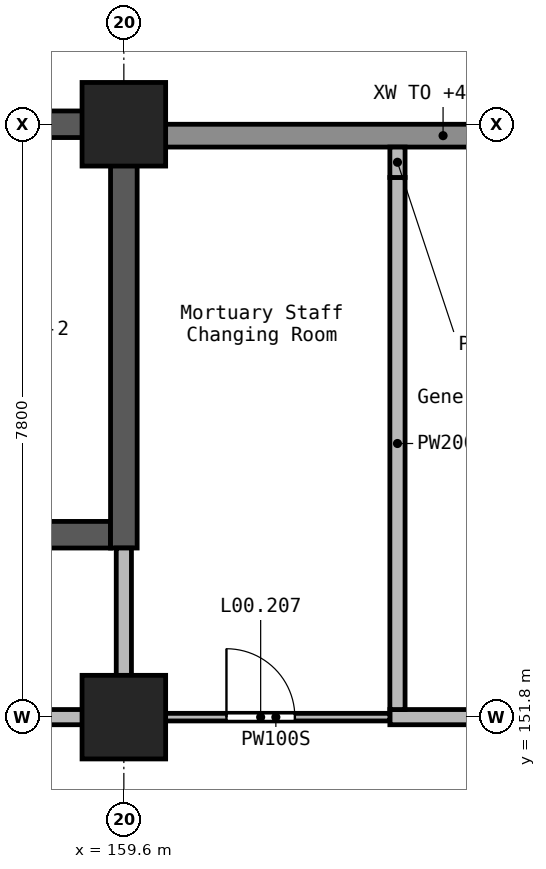
"""IFC4 building model, lengths in metres.
Left out: names, types, materials, properties, quantities, classifications, styles, units other than length and angle.
Written with IfcOpenShell. Run it as: python <this file> out.ifc"""

import sys

from ifc_helpers import new_model, si_unit, direction, frame, frame_2d, origin, origin_2d, place, context, subcontext, project, spatial, rectangle, extrude, element, fill, save


model = new_model("IFC4")
c1 = context("Model", 3, precision=1e-05, world=origin(), true_north=direction((0.0, 1.0)))
c2 = subcontext(c1, "Body", "Model", "MODEL_VIEW")
j1 = project(units=[si_unit("LENGTHUNIT", "METRE"), si_unit("PLANEANGLEUNIT", "RADIAN")], contexts=[c1])
p1 = place(None, origin())
s1 = spatial("IfcSite", under=j1, at=p1, CompositionType="ELEMENT")
p2 = place(p1, origin())
s2 = spatial("IfcBuilding", under=s1, at=p2, CompositionType="ELEMENT")
p3 = place(p2, origin())
s3 = spatial("IfcBuildingStorey", under=s2, at=p3, CompositionType="ELEMENT", Elevation=0.0)
for number, where, z_axis, x_axis in (
    (1, (159.6, 151.8, -0.3), (0.0, 0.0, 1.0), (1.0, 0.0, 0.0)),
    (2, (159.6, 159.6, -0.3), (0.0, 0.0, 1.0), (1.0, 0.0, 0.0)),
):
    element("IfcColumn", number, at=place(p3, frame(where, z_axis=z_axis, x_axis=x_axis)), inside=s3, PredefinedType="COLUMN", context=c2, shape_type="SweptSolid", body=[
        extrude(rectangle(XDim=1.1, YDim=1.1, at=origin_2d()), origin(), (0.0, 0.0, 1.0), 5.7),
    ])
p4 = place(p3, frame((155.4, 154.2, -0.3), z_axis=(0.0, 0.0, 1.0), x_axis=(1.0, 0.0, 0.0)))
e3 = element("IfcWall", 3, at=p4, inside=s3, PredefinedType="SHEAR", context=c2, shape_type="SweptSolid", body=[
    extrude(rectangle(XDim=4.025, YDim=0.35, at=frame_2d((2.013, 0.0))), origin(), (0.0, 0.0, 1.0), 5.7),
])
p5 = place(p4, frame((1.55, 0.0, 0.3)))
e4 = element("IfcOpeningElement", 4, at=p5, cuts=e3, PredefinedType="OPENING", context=c2, shape_type="SweptSolid", body=[
    extrude(rectangle(XDim=1.1, YDim=2.1, at=frame_2d((0.55, 1.05))), frame((0.0, 0.185, 0.0), z_axis=(0.0, -1.0, 0.0), x_axis=(1.0, 0.0, 0.0)), (0.0, 0.0, 1.0), 0.37),
])
p6 = place(p3, frame((155.4, 159.6, -0.3), z_axis=(0.0, 0.0, 1.0), x_axis=(1.0, 0.0, 0.0)))
e5 = element("IfcWall", 5, at=p6, inside=s3, PredefinedType="SHEAR", context=c2, shape_type="SweptSolid", body=[
    extrude(rectangle(XDim=4.025, YDim=0.35, at=frame_2d((2.013, 0.0))), origin(), (0.0, 0.0, 1.0), 5.7),
])
p7 = place(p3, frame((159.6, 154.025, -0.3), z_axis=(0.0, 0.0, 1.0), x_axis=(0.0, 1.0, 0.0)))
e6 = element("IfcWall", 6, at=p7, inside=s3, PredefinedType="SHEAR", context=c2, shape_type="SweptSolid", body=[
    extrude(rectangle(XDim=5.75, YDim=0.35, at=frame_2d((2.875, 0.0))), origin(), (0.0, 0.0, 1.0), 5.7),
])
p8 = place(p3, frame((167.5, 159.45, 0.0), z_axis=(0.0, 0.0, 1.0), x_axis=(-1.0, 0.0, 0.0)))
e7 = element("IfcWall", 7, at=p8, inside=s3, PredefinedType="STANDARD", context=c2, shape_type="SweptSolid", body=[
    extrude(rectangle(XDim=7.4, YDim=0.3, at=frame_2d((3.7, 0.0))), origin(), (0.0, 0.0, 1.0), 4.25),
])
p9 = place(p8, frame((0.7, 0.0, 0.0)))
e8 = element("IfcOpeningElement", 8, at=p9, cuts=e7, PredefinedType="OPENING", context=c2, shape_type="SweptSolid", body=[
    extrude(rectangle(XDim=2.4, YDim=2.4, at=frame_2d((1.2, 1.2))), frame((0.0, 0.16, 0.0), z_axis=(0.0, -1.0, 0.0), x_axis=(1.0, 0.0, 0.0)), (0.0, 0.0, 1.0), 0.32),
])
p10 = place(p3, frame((159.1, 151.8, 0.0), z_axis=(0.0, 0.0, 1.0), x_axis=(-1.0, 0.0, 0.0)))
e9 = element("IfcWall", 9, at=p10, inside=s3, PredefinedType="SOLIDWALL", context=c2, shape_type="SweptSolid", body=[
    extrude(rectangle(XDim=7.4, YDim=0.2, at=frame_2d((3.7, 0.0))), origin(), (0.0, 0.0, 1.0), 5.05),
])
p11 = place(p10, frame((2.8, 0.0, 0.0)))
e10 = element("IfcOpeningElement", 10, at=p11, cuts=e9, PredefinedType="OPENING", context=c2, shape_type="SweptSolid", body=[
    extrude(rectangle(XDim=1.8, YDim=2.1, at=frame_2d((0.9, 1.05))), frame((0.0, 0.11, 0.0), z_axis=(0.0, -1.0, 0.0), x_axis=(1.0, 0.0, 0.0)), (0.0, 0.0, 1.0), 0.22),
])
p12 = place(p3, frame((163.1, 151.8, 0.0), z_axis=(0.0, 0.0, 1.0), x_axis=(1.0, 0.0, 0.0)))
e11 = element("IfcWall", 11, at=p12, inside=s3, PredefinedType="SOLIDWALL", context=c2, shape_type="SweptSolid", body=[
    extrude(rectangle(XDim=4.4, YDim=0.2, at=frame_2d((2.2, 0.0))), origin(), (0.0, 0.0, 1.0), 5.05),
])
p13 = place(p12, frame((2.0, 0.0, 0.0)))
e12 = element("IfcOpeningElement", 12, at=p13, cuts=e11, PredefinedType="OPENING", context=c2, shape_type="SweptSolid", body=[
    extrude(rectangle(XDim=1.0, YDim=2.1, at=frame_2d((0.5, 1.05))), frame((0.0, 0.11, 0.0), z_axis=(0.0, -1.0, 0.0), x_axis=(1.0, 0.0, 0.0)), (0.0, 0.0, 1.0), 0.22),
])
p14 = place(p3, frame((163.2, 151.9, 0.0), z_axis=(0.0, 0.0, 1.0), x_axis=(0.0, 1.0, 0.0)))
e13 = element("IfcWall", 13, at=p14, inside=s3, PredefinedType="SOLIDWALL", context=c2, shape_type="SweptSolid", body=[
    extrude(rectangle(XDim=7.0, YDim=0.2, at=frame_2d((3.5, 0.0))), origin(), (0.0, 0.0, 1.0), 5.05),
])
p15 = place(p3, frame((163.2, 158.9, 0.0), z_axis=(0.0, 0.0, 1.0), x_axis=(0.0, 1.0, 0.0)))
e14 = element("IfcWall", 14, at=p15, inside=s3, PredefinedType="SOLIDWALL", context=c2, shape_type="SweptSolid", body=[
    extrude(rectangle(XDim=0.4, YDim=0.2, at=frame_2d((0.2, 0.0))), origin(), (0.0, 0.0, 1.0), 4.28),
])
p16 = place(p3, frame((159.6, 152.3, 0.0), z_axis=(0.0, 0.0, 1.0), x_axis=(0.0, 1.0, 0.0)))
e15 = element("IfcWall", 15, at=p16, inside=s3, PredefinedType="SOLIDWALL", context=c2, shape_type="SweptSolid", body=[
    extrude(rectangle(XDim=1.725, YDim=0.2, at=frame_2d((0.862, 0.0))), origin(), (0.0, 0.0, 1.0), 5.05),
])
p17 = place(p3, frame((160.1, 151.8, 0.0), z_axis=(0.0, 0.0, 1.0), x_axis=(1.0, 0.0, 0.0)))
e16 = element("IfcWall", 16, at=p17, inside=s3, PredefinedType="PARTITIONING", context=c2, shape_type="SweptSolid", body=[
    extrude(rectangle(XDim=3.0, YDim=0.1, at=frame_2d((1.5, 0.0))), origin(), (0.0, 0.0, 1.0), 5.05),
])
p18 = place(p17, frame((0.85, 0.0, 0.0)))
e17 = element("IfcOpeningElement", 17, at=p18, cuts=e16, PredefinedType="OPENING", context=c2, shape_type="SweptSolid", body=[
    extrude(rectangle(XDim=0.9, YDim=2.1, at=frame_2d((0.45, 1.05))), frame((0.0, 0.06, 0.0), z_axis=(0.0, -1.0, 0.0), x_axis=(1.0, 0.0, 0.0)), (0.0, 0.0, 1.0), 0.12),
])
p19 = place(p18, origin())
e18 = element("IfcDoor", 18, at=p19, inside=s3, OperationType="SINGLE_SWING_LEFT", PredefinedType="DOOR", context=c2, shape_type="SweptSolid", body=[
    extrude(rectangle(XDim=0.9, YDim=2.1, at=frame_2d((0.45, 1.05))), frame((0.0, 0.025, 0.0), z_axis=(0.0, -1.0, 0.0), x_axis=(1.0, 0.0, 0.0)), (0.0, 0.0, 1.0), 0.05),
])
fill(e17, e18)
save(model, sys.argv[1])
